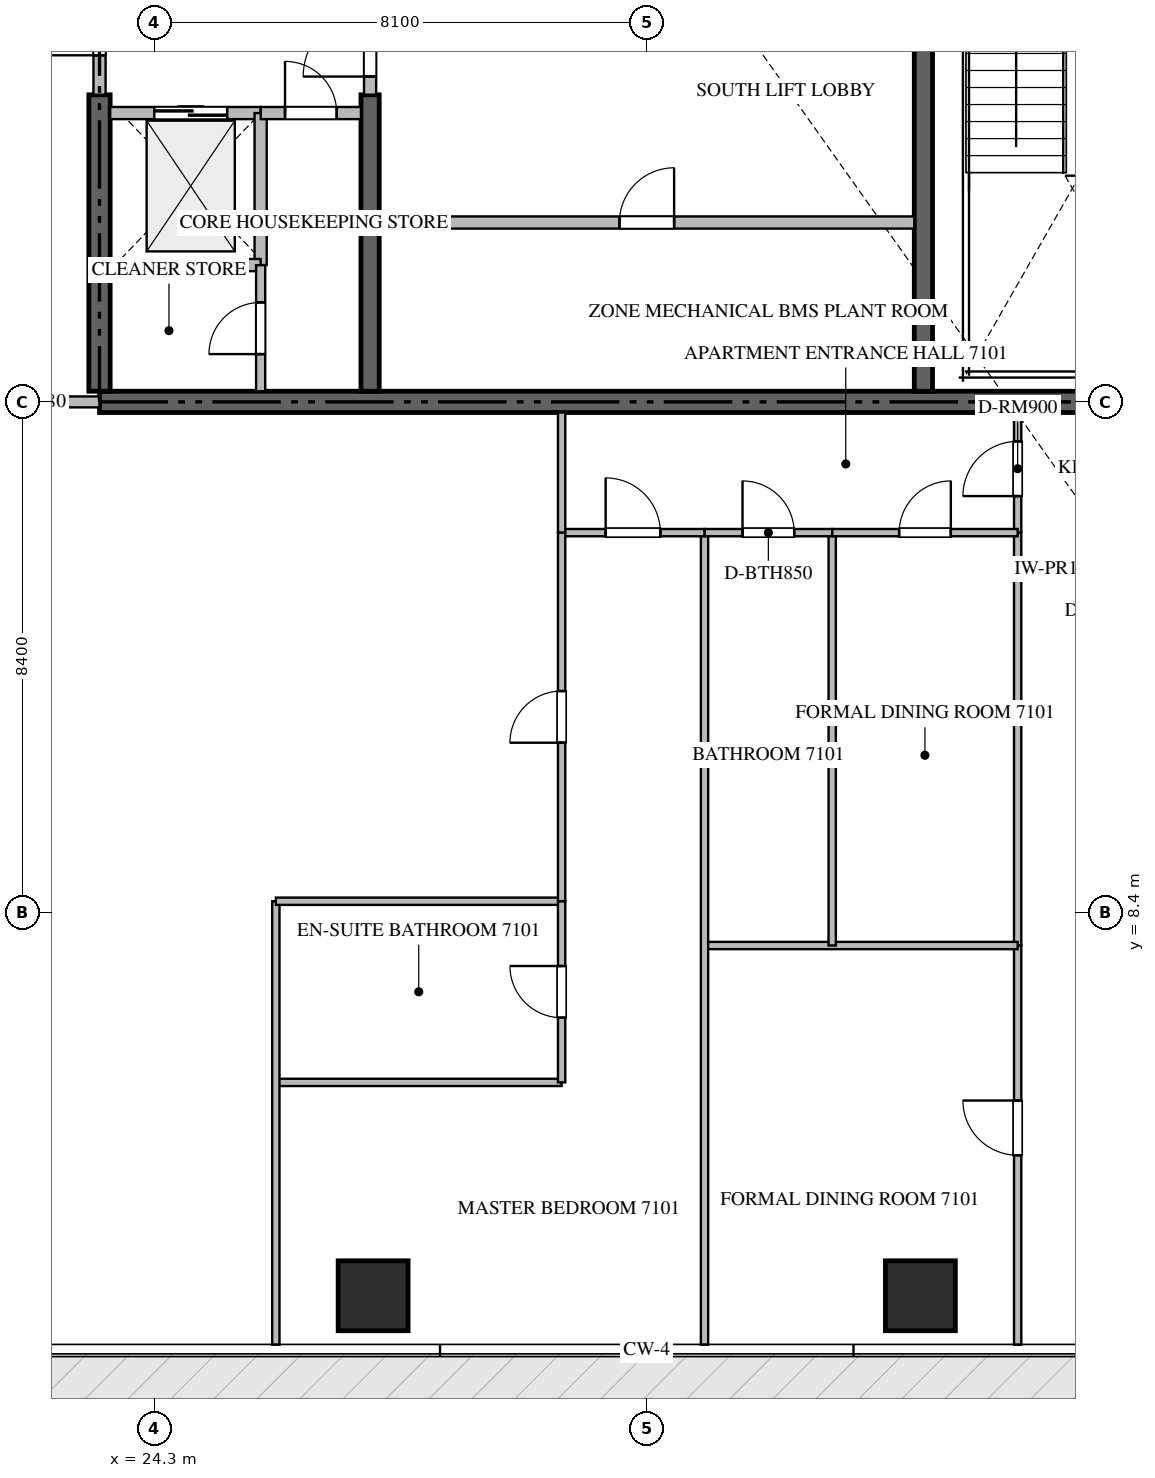
"""IFC4 building model, lengths in metres.
Left out: names, types, materials, properties, quantities, classifications, styles, units other than length and angle.
Written with IfcOpenShell. Run it as: python <this file> out.ifc"""

import sys

from ifc_helpers import new_model, si_unit, direction, frame, frame_2d, origin, origin_2d, place, context, subcontext, project, spatial, rectangle, extrude, source, transform, mapped, element, fill, save


model = new_model("IFC4")
c1 = context("Model", 3, precision=1e-05, world=origin(), true_north=direction((0.0, 1.0)))
c2 = subcontext(c1, "Body", "Model", "MODEL_VIEW")
j1 = project(units=[si_unit("LENGTHUNIT", "METRE"), si_unit("PLANEANGLEUNIT", "RADIAN")], contexts=[c1])
p1 = place(None, origin())
s1 = spatial("IfcSite", under=j1, at=p1, CompositionType="ELEMENT")
p2 = place(p1, origin())
s2 = spatial("IfcBuilding", under=s1, at=p2, CompositionType="ELEMENT")
p3 = place(p2, frame((0.0, 0.0, 283.6)))
s3 = spatial("IfcBuildingStorey", under=s2, at=p3, CompositionType="ELEMENT", Elevation=283.6)
p4 = place(p3, frame((23.4, 16.8, -0.26), z_axis=(0.0, 0.0, 1.0), x_axis=(1.0, 0.0, 0.0)))
e1 = element("IfcWall", 1, at=p4, inside=s3, PredefinedType="SHEAR", context=c2, shape_type="SweptSolid", body=[
    extrude(rectangle(XDim=18.0, YDim=0.35, at=frame_2d((9.0, 0.0))), origin(), (0.0, 0.0, 1.0), 3.668),
])
p5 = place(p3, frame((23.4, 16.975, -0.26), z_axis=(0.0, 0.0, 1.0), x_axis=(0.0, 1.0, 0.0)))
e2 = element("IfcWall", 2, at=p5, inside=s3, PredefinedType="SHEAR", context=c2, shape_type="SweptSolid", body=[
    extrude(rectangle(XDim=4.875, YDim=0.35, at=frame_2d((2.438, 0.0))), origin(), (0.0, 0.0, 1.0), 3.668),
])
p6 = place(p3, frame((27.85, 16.975, -0.26), z_axis=(0.0, 0.0, 1.0), x_axis=(0.0, 1.0, 0.0)))
e3 = element("IfcWall", 3, at=p6, inside=s3, PredefinedType="SHEAR", context=c2, shape_type="SweptSolid", body=[
    extrude(rectangle(XDim=4.875, YDim=0.3, at=frame_2d((2.438, 0.0))), origin(), (0.0, 0.0, 1.0), 3.668),
])
p7 = place(p3, frame((36.95, 16.975, -0.26), z_axis=(0.0, 0.0, 1.0), x_axis=(0.0, 1.0, 0.0)))
e4 = element("IfcWall", 4, at=p7, inside=s3, PredefinedType="SHEAR", context=c2, shape_type="SweptSolid", body=[
    extrude(rectangle(XDim=8.375, YDim=0.3, at=frame_2d((4.188, 0.0))), origin(), (0.0, 0.0, 1.0), 3.668),
])
m1 = source(origin(), c2, "Body", "SweptSolid", [
    extrude(rectangle(XDim=1.15, YDim=1.15, at=origin_2d()), origin(), (0.0, 0.0, 1.0), 3.67),
])
for number, where, z_axis, x_axis in (
    (5, (27.9, 2.1, -0.26), (0.0, 0.0, 1.0), (1.0, 0.0, 0.0)),
    (6, (36.9, 2.1, -0.26), (0.0, 0.0, 1.0), (1.0, 0.0, 0.0)),
):
    element("IfcColumn", number, at=place(p3, frame(where, z_axis=z_axis, x_axis=x_axis)), inside=s3, PredefinedType="COLUMN", context=c2, shape_type="MappedRepresentation", body=[
        mapped(m1, transform((0.0, 0.0, 0.0), scale=1.0)),
    ])
p8 = place(p3, frame((23.575, 21.55, 0.0), z_axis=(0.0, 0.0, 1.0), x_axis=(1.0, 0.0, 0.0)))
e7 = element("IfcWall", 7, at=p8, inside=s3, PredefinedType="STANDARD", context=c2, shape_type="SweptSolid", body=[
    extrude(rectangle(XDim=2.475, YDim=0.2, at=frame_2d((1.238, 0.0))), origin(), (0.0, 0.0, 1.0), 3.41),
])
p9 = place(p8, frame((0.725, 0.0, 0.0)))
e8 = element("IfcOpeningElement", 8, at=p9, cuts=e7, PredefinedType="OPENING", context=c2, shape_type="SweptSolid", body=[
    extrude(rectangle(XDim=1.2, YDim=2.2, at=frame_2d((0.6, 1.1))), frame((0.0, 0.11, 0.0), z_axis=(0.0, -1.0, 0.0), x_axis=(1.0, 0.0, 0.0)), (0.0, 0.0, 1.0), 0.22),
])
p10 = place(p3, frame((26.05, 19.05, 0.0), z_axis=(0.0, 0.0, 1.0), x_axis=(0.0, 1.0, 0.0)))
e9 = element("IfcWall", 9, at=p10, inside=s3, PredefinedType="STANDARD", context=c2, shape_type="SweptSolid", body=[
    extrude(rectangle(XDim=2.5, YDim=0.2, at=frame_2d((1.25, 0.0))), origin(), (0.0, 0.0, 1.0), 3.41),
])
p11 = place(p3, frame((23.575, 19.05, 0.0), z_axis=(0.0, 0.0, 1.0), x_axis=(1.0, 0.0, 0.0)))
e10 = element("IfcWall", 10, at=p11, inside=s3, PredefinedType="STANDARD", context=c2, shape_type="SweptSolid", body=[
    extrude(rectangle(XDim=2.475, YDim=0.2, at=frame_2d((1.238, 0.0))), origin(), (0.0, 0.0, 1.0), 3.41),
])
p12 = place(p3, frame((26.052, 21.55, 0.0), z_axis=(0.0, 0.0, 1.0), x_axis=(1.0, 0.0, 0.0)))
e11 = element("IfcWall", 11, at=p12, inside=s3, PredefinedType="STANDARD", context=c2, shape_type="SweptSolid", body=[
    extrude(rectangle(XDim=1.648, YDim=0.2, at=frame_2d((0.824, 0.0))), origin(), (0.0, 0.0, 1.0), 3.41),
])
p13 = place(p12, frame((0.399, 0.0, 0.0)))
e12 = element("IfcOpeningElement", 12, at=p13, cuts=e11, PredefinedType="OPENING", context=c2, shape_type="SweptSolid", body=[
    extrude(rectangle(XDim=0.85, YDim=2.1, at=frame_2d((0.425, 1.05))), frame((0.0, 0.11, 0.0), z_axis=(0.0, -1.0, 0.0), x_axis=(1.0, 0.0, 0.0)), (0.0, 0.0, 1.0), 0.22),
])
p14 = place(p3, frame((23.4, 21.852, 0.0), z_axis=(0.0, 0.0, 1.0), x_axis=(0.0, 1.0, 0.0)))
e13 = element("IfcWall", 13, at=p14, inside=s3, PredefinedType="STANDARD", context=c2, shape_type="SweptSolid", body=[
    extrude(rectangle(XDim=2.396, YDim=0.2, at=frame_2d((1.198, 0.0))), origin(), (0.0, 0.0, 1.0), 3.41),
])
p15 = place(p14, frame((0.648, 0.0, 0.0)))
e14 = element("IfcOpeningElement", 14, at=p15, cuts=e13, PredefinedType="OPENING", context=c2, shape_type="SweptSolid", body=[
    extrude(rectangle(XDim=1.1, YDim=2.15, at=frame_2d((0.55, 1.075))), frame((0.0, 0.11, 0.0), z_axis=(0.0, -1.0, 0.0), x_axis=(1.0, 0.0, 0.0)), (0.0, 0.0, 1.0), 0.22),
])
p16 = place(p3, frame((27.85, 21.852, 0.0), z_axis=(0.0, 0.0, 1.0), x_axis=(0.0, 1.0, 0.0)))
e15 = element("IfcWall", 15, at=p16, inside=s3, PredefinedType="STANDARD", context=c2, shape_type="SweptSolid", body=[
    extrude(rectangle(XDim=1.696, YDim=0.2, at=frame_2d((0.848, 0.0))), origin(), (0.0, 0.0, 1.0), 3.41),
])
p17 = place(p16, frame((0.298, 0.0, 0.0)))
e16 = element("IfcOpeningElement", 16, at=p17, cuts=e15, PredefinedType="OPENING", context=c2, shape_type="SweptSolid", body=[
    extrude(rectangle(XDim=1.1, YDim=2.15, at=frame_2d((0.55, 1.075))), frame((0.0, 0.11, 0.0), z_axis=(0.0, -1.0, 0.0), x_axis=(1.0, 0.0, 0.0)), (0.0, 0.0, 1.0), 0.22),
])
p18 = place(p3, frame((26.05, 16.975, 0.0), z_axis=(0.0, 0.0, 1.0), x_axis=(0.0, 1.0, 0.0)))
e17 = element("IfcWall", 17, at=p18, inside=s3, PredefinedType="PARTITIONING", context=c2, shape_type="SweptSolid", body=[
    extrude(rectangle(XDim=2.073, YDim=0.15, at=frame_2d((1.037, 0.0))), origin(), (0.0, 0.0, 1.0), 3.41),
])
p19 = place(p18, frame((0.611, 0.0, 0.0)))
e18 = element("IfcOpeningElement", 18, at=p19, cuts=e17, PredefinedType="OPENING", context=c2, shape_type="SweptSolid", body=[
    extrude(rectangle(XDim=0.85, YDim=2.1, at=frame_2d((0.425, 1.05))), frame((0.0, 0.085, 0.0), z_axis=(0.0, -1.0, 0.0), x_axis=(1.0, 0.0, 0.0)), (0.0, 0.0, 1.0), 0.17),
])
p20 = place(p3, frame((28.0, 19.75, 0.0), z_axis=(0.0, 0.0, 1.0), x_axis=(1.0, 0.0, 0.0)))
e19 = element("IfcWall", 19, at=p20, inside=s3, PredefinedType="STANDARD", context=c2, shape_type="SweptSolid", body=[
    extrude(rectangle(XDim=8.8, YDim=0.2, at=frame_2d((4.4, 0.0))), origin(), (0.0, 0.0, 1.0), 3.41),
])
p21 = place(p20, frame((3.95, 0.0, 0.0)))
e20 = element("IfcOpeningElement", 20, at=p21, cuts=e19, PredefinedType="OPENING", context=c2, shape_type="SweptSolid", body=[
    extrude(rectangle(XDim=0.9, YDim=2.1, at=frame_2d((0.45, 1.05))), frame((0.0, 0.11, 0.0), z_axis=(0.0, -1.0, 0.0), x_axis=(1.0, 0.0, 0.0)), (0.0, 0.0, 1.0), 0.22),
])
p22 = place(p3, frame((20.902, 16.8, 0.0), z_axis=(0.0, 0.0, 1.0), x_axis=(1.0, 0.0, 0.0)))
e21 = element("IfcWall", 21, at=p22, inside=s3, PredefinedType="PARTITIONING", context=c2, shape_type="SweptSolid", body=[
    extrude(rectangle(XDim=2.496, YDim=0.18, at=frame_2d((1.248, 0.0))), origin(), (0.0, 0.0, 1.0), 3.41),
])
p23 = place(p3, frame((38.5, 14.05, 0.0), z_axis=(0.0, 0.0, 1.0), x_axis=(1.0, 0.0, 0.0)))
e22 = element("IfcWall", 22, at=p23, inside=s3, PredefinedType="PARTITIONING", context=c2, shape_type="SweptSolid", body=[
    extrude(rectangle(XDim=2.85, YDim=0.12, at=frame_2d((1.425, 0.0))), origin(), (0.0, 0.0, 1.0), 3.41),
])
p24 = place(p23, frame((1.0, 0.0, 0.0)))
e23 = element("IfcOpeningElement", 23, at=p24, cuts=e22, PredefinedType="OPENING", context=c2, shape_type="SweptSolid", body=[
    extrude(rectangle(XDim=0.85, YDim=2.1, at=frame_2d((0.425, 1.05))), frame((0.0, 0.07, 0.0), z_axis=(0.0, -1.0, 0.0), x_axis=(1.0, 0.0, 0.0)), (0.0, 0.0, 1.0), 0.14),
])
p25 = place(p3, frame((38.5, 14.65, 0.0), z_axis=(0.0, 0.0, 1.0), x_axis=(0.0, 1.0, 0.0)))
e24 = element("IfcWall", 24, at=p25, inside=s3, PredefinedType="PARTITIONING", context=c2, shape_type="SweptSolid", body=[
    extrude(rectangle(XDim=1.975, YDim=0.12, at=frame_2d((0.988, 0.0))), origin(), (0.0, 0.0, 1.0), 3.41),
])
p26 = place(p25, frame((0.601, 0.0, 0.0)))
e25 = element("IfcOpeningElement", 25, at=p26, cuts=e24, PredefinedType="OPENING", context=c2, shape_type="SweptSolid", body=[
    extrude(rectangle(XDim=0.9, YDim=2.1, at=frame_2d((0.45, 1.05))), frame((0.0, 0.07, 0.0), z_axis=(0.0, -1.0, 0.0), x_axis=(1.0, 0.0, 0.0)), (0.0, 0.0, 1.0), 0.14),
])
p27 = place(p3, frame((38.5, 1.295, 0.0), z_axis=(0.0, 0.0, 1.0), x_axis=(0.0, 1.0, 0.0)))
e26 = element("IfcWall", 26, at=p27, inside=s3, PredefinedType="PARTITIONING", context=c2, shape_type="SweptSolid", body=[
    extrude(rectangle(XDim=6.565, YDim=0.12, at=frame_2d((3.283, 0.0))), origin(), (0.0, 0.0, 1.0), 3.41),
])
p28 = place(p27, frame((3.116, 0.0, 0.0)))
e27 = element("IfcOpeningElement", 27, at=p28, cuts=e26, PredefinedType="OPENING", context=c2, shape_type="SweptSolid", body=[
    extrude(rectangle(XDim=0.9, YDim=2.1, at=frame_2d((0.45, 1.05))), frame((0.0, 0.07, 0.0), z_axis=(0.0, -1.0, 0.0), x_axis=(1.0, 0.0, 0.0)), (0.0, 0.0, 1.0), 0.14),
])
p29 = place(p3, frame((38.5, 7.862, 0.0), z_axis=(0.0, 0.0, 1.0), x_axis=(0.0, 1.0, 0.0)))
e28 = element("IfcWall", 28, at=p29, inside=s3, PredefinedType="PARTITIONING", context=c2, shape_type="SweptSolid", body=[
    extrude(rectangle(XDim=6.786, YDim=0.12, at=frame_2d((3.393, 0.0))), origin(), (0.0, 0.0, 1.0), 3.41),
])
p30 = place(p3, frame((33.35, 7.86, 0.0), z_axis=(0.0, 0.0, 1.0), x_axis=(1.0, 0.0, 0.0)))
e29 = element("IfcWall", 29, at=p30, inside=s3, PredefinedType="PARTITIONING", context=c2, shape_type="SweptSolid", body=[
    extrude(rectangle(XDim=5.15, YDim=0.12, at=frame_2d((2.575, 0.0))), origin(), (0.0, 0.0, 1.0), 3.41),
])
p31 = place(p3, frame((33.35, 1.295, 0.0), z_axis=(0.0, 0.0, 1.0), x_axis=(0.0, 1.0, 0.0)))
e30 = element("IfcWall", 30, at=p31, inside=s3, PredefinedType="PARTITIONING", context=c2, shape_type="SweptSolid", body=[
    extrude(rectangle(XDim=13.355, YDim=0.12, at=frame_2d((6.677, 0.0))), origin(), (0.0, 0.0, 1.0), 3.41),
])
p32 = place(p3, frame((35.45, 7.86, 0.0), z_axis=(0.0, 0.0, 1.0), x_axis=(0.0, 1.0, 0.0)))
e31 = element("IfcWall", 31, at=p32, inside=s3, PredefinedType="PARTITIONING", context=c2, shape_type="SweptSolid", body=[
    extrude(rectangle(XDim=6.79, YDim=0.12, at=frame_2d((3.395, 0.0))), origin(), (0.0, 0.0, 1.0), 3.41),
])
p33 = place(p3, frame((33.35, 14.65, 0.0), z_axis=(0.0, 0.0, 1.0), x_axis=(1.0, 0.0, 0.0)))
e32 = element("IfcWall", 32, at=p33, inside=s3, PredefinedType="PARTITIONING", context=c2, shape_type="SweptSolid", body=[
    extrude(rectangle(XDim=2.1, YDim=0.12, at=frame_2d((1.05, 0.0))), origin(), (0.0, 0.0, 1.0), 3.41),
])
p34 = place(p33, frame((0.625, 0.0, 0.0)))
e33 = element("IfcOpeningElement", 33, at=p34, cuts=e32, PredefinedType="OPENING", context=c2, shape_type="SweptSolid", body=[
    extrude(rectangle(XDim=0.85, YDim=2.1, at=frame_2d((0.425, 1.05))), frame((0.0, 0.07, 0.0), z_axis=(0.0, -1.0, 0.0), x_axis=(1.0, 0.0, 0.0)), (0.0, 0.0, 1.0), 0.14),
])
p35 = place(p3, frame((35.452, 14.65, 0.0), z_axis=(0.0, 0.0, 1.0), x_axis=(1.0, 0.0, 0.0)))
e34 = element("IfcWall", 34, at=p35, inside=s3, PredefinedType="PARTITIONING", context=c2, shape_type="SweptSolid", body=[
    extrude(rectangle(XDim=3.048, YDim=0.12, at=frame_2d((1.524, 0.0))), origin(), (0.0, 0.0, 1.0), 3.41),
])
p36 = place(p35, frame((1.099, 0.0, 0.0)))
e35 = element("IfcOpeningElement", 35, at=p36, cuts=e34, PredefinedType="OPENING", context=c2, shape_type="SweptSolid", body=[
    extrude(rectangle(XDim=0.85, YDim=2.1, at=frame_2d((0.425, 1.05))), frame((0.0, 0.07, 0.0), z_axis=(0.0, -1.0, 0.0), x_axis=(1.0, 0.0, 0.0)), (0.0, 0.0, 1.0), 0.14),
])
p37 = place(p3, frame((31.0, 14.65, 0.0), z_axis=(0.0, 0.0, 1.0), x_axis=(1.0, 0.0, 0.0)))
e36 = element("IfcWall", 36, at=p37, inside=s3, PredefinedType="PARTITIONING", context=c2, shape_type="SweptSolid", body=[
    extrude(rectangle(XDim=2.348, YDim=0.12, at=frame_2d((1.174, 0.0))), origin(), (0.0, 0.0, 1.0), 3.41),
])
p38 = place(p37, frame((0.724, 0.0, 0.0)))
e37 = element("IfcOpeningElement", 37, at=p38, cuts=e36, PredefinedType="OPENING", context=c2, shape_type="SweptSolid", body=[
    extrude(rectangle(XDim=0.9, YDim=2.1, at=frame_2d((0.45, 1.05))), frame((0.0, 0.07, 0.0), z_axis=(0.0, -1.0, 0.0), x_axis=(1.0, 0.0, 0.0)), (0.0, 0.0, 1.0), 0.14),
])
p39 = place(p3, frame((26.3, 5.609, 0.0), z_axis=(0.0, 0.0, 1.0), x_axis=(1.0, 0.0, 0.0)))
e38 = element("IfcWall", 38, at=p39, inside=s3, PredefinedType="PARTITIONING", context=c2, shape_type="SweptSolid", body=[
    extrude(rectangle(XDim=4.7, YDim=0.12, at=frame_2d((2.35, 0.0))), origin(), (0.0, 0.0, 1.0), 3.41),
])
p40 = place(p3, frame((26.3, 1.295, 0.0), z_axis=(0.0, 0.0, 1.0), x_axis=(0.0, 1.0, 0.0)))
e39 = element("IfcWall", 39, at=p40, inside=s3, PredefinedType="PARTITIONING", context=c2, shape_type="SweptSolid", body=[
    extrude(rectangle(XDim=7.293, YDim=0.12, at=frame_2d((3.646, 0.0))), origin(), (0.0, 0.0, 1.0), 3.41),
])
p41 = place(p3, frame((26.3, 8.588, 0.0), z_axis=(0.0, 0.0, 1.0), x_axis=(1.0, 0.0, 0.0)))
e40 = element("IfcWall", 40, at=p41, inside=s3, PredefinedType="PARTITIONING", context=c2, shape_type="SweptSolid", body=[
    extrude(rectangle(XDim=4.7, YDim=0.12, at=frame_2d((2.35, 0.0))), origin(), (0.0, 0.0, 1.0), 3.41),
])
p42 = place(p3, frame((31.0, 5.609, 0.0), z_axis=(0.0, 0.0, 1.0), x_axis=(0.0, 1.0, 0.0)))
e41 = element("IfcWall", 41, at=p42, inside=s3, PredefinedType="PARTITIONING", context=c2, shape_type="SweptSolid", body=[
    extrude(rectangle(XDim=2.979, YDim=0.12, at=frame_2d((1.49, 0.0))), origin(), (0.0, 0.0, 1.0), 3.41),
])
p43 = place(p42, frame((1.064, 0.0, 0.0)))
e42 = element("IfcOpeningElement", 42, at=p43, cuts=e41, PredefinedType="OPENING", context=c2, shape_type="SweptSolid", body=[
    extrude(rectangle(XDim=0.85, YDim=2.1, at=frame_2d((0.425, 1.05))), frame((0.0, 0.07, 0.0), z_axis=(0.0, -1.0, 0.0), x_axis=(1.0, 0.0, 0.0)), (0.0, 0.0, 1.0), 0.14),
])
p44 = place(p3, frame((31.0, 8.59, 0.0), z_axis=(0.0, 0.0, 1.0), x_axis=(0.0, 1.0, 0.0)))
e43 = element("IfcWall", 43, at=p44, inside=s3, PredefinedType="PARTITIONING", context=c2, shape_type="SweptSolid", body=[
    extrude(rectangle(XDim=6.06, YDim=0.12, at=frame_2d((3.03, 0.0))), origin(), (0.0, 0.0, 1.0), 3.41),
])
p45 = place(p44, frame((2.605, 0.0, 0.0)))
e44 = element("IfcOpeningElement", 44, at=p45, cuts=e43, PredefinedType="OPENING", context=c2, shape_type="SweptSolid", body=[
    extrude(rectangle(XDim=0.85, YDim=2.1, at=frame_2d((0.425, 1.05))), frame((0.0, 0.07, 0.0), z_axis=(0.0, -1.0, 0.0), x_axis=(1.0, 0.0, 0.0)), (0.0, 0.0, 1.0), 0.14),
])
p46 = place(p3, frame((31.0, 14.652, 0.0), z_axis=(0.0, 0.0, 1.0), x_axis=(0.0, 1.0, 0.0)))
e45 = element("IfcWall", 45, at=p46, inside=s3, PredefinedType="PARTITIONING", context=c2, shape_type="SweptSolid", body=[
    extrude(rectangle(XDim=1.973, YDim=0.12, at=frame_2d((0.986, 0.0))), origin(), (0.0, 0.0, 1.0), 3.41),
])
m2 = source(origin(), c2, "Body", "SweptSolid", [
    extrude(rectangle(XDim=1.2, YDim=2.2, at=frame_2d((0.6, 1.1))), frame((0.0, 0.025, 0.0), z_axis=(0.0, -1.0, 0.0), x_axis=(1.0, 0.0, 0.0)), (0.0, 0.0, 1.0), 0.05),
])
p47 = place(p9, origin())
e46 = element("IfcDoor", 46, at=p47, inside=s3, OperationType="DOUBLE_DOOR_SLIDING", PredefinedType="DOOR", context=c2, shape_type="MappedRepresentation", body=[
    mapped(m2, transform((0.0, 0.0, 0.0), scale=1.0)),
])
fill(e8, e46)
m3 = source(origin(), c2, "Body", "SweptSolid", [
    extrude(rectangle(XDim=0.85, YDim=2.1, at=frame_2d((0.425, 1.05))), frame((0.0, 0.025, 0.0), z_axis=(0.0, -1.0, 0.0), x_axis=(1.0, 0.0, 0.0)), (0.0, 0.0, 1.0), 0.05),
])
p48 = place(p13, origin())
e47 = element("IfcDoor", 47, at=p48, inside=s3, OperationType="SINGLE_SWING_LEFT", PredefinedType="DOOR", context=c2, shape_type="MappedRepresentation", body=[
    mapped(m3, transform((0.0, 0.0, 0.0), scale=1.0)),
])
fill(e12, e47)
m4 = source(origin(), c2, "Body", "SweptSolid", [
    extrude(rectangle(XDim=1.1, YDim=2.15, at=frame_2d((0.55, 1.075))), frame((0.0, 0.025, 0.0), z_axis=(0.0, -1.0, 0.0), x_axis=(1.0, 0.0, 0.0)), (0.0, 0.0, 1.0), 0.05),
])
p49 = place(p15, origin())
e48 = element("IfcDoor", 48, at=p49, inside=s3, OperationType="SINGLE_SWING_LEFT", PredefinedType="DOOR", context=c2, shape_type="MappedRepresentation", body=[
    mapped(m4, transform((0.0, 0.0, 0.0), scale=1.0)),
])
fill(e14, e48)
p50 = place(p17, origin())
e49 = element("IfcDoor", 49, at=p50, inside=s3, OperationType="SINGLE_SWING_LEFT", PredefinedType="DOOR", context=c2, shape_type="MappedRepresentation", body=[
    mapped(m4, transform((0.0, 0.0, 0.0), scale=1.0)),
])
fill(e16, e49)
p51 = place(p19, origin())
e50 = element("IfcDoor", 50, at=p51, inside=s3, OperationType="SINGLE_SWING_LEFT", PredefinedType="DOOR", context=c2, shape_type="MappedRepresentation", body=[
    mapped(m3, transform((0.0, 0.0, 0.0), scale=1.0)),
])
fill(e18, e50)
m5 = source(origin(), c2, "Body", "SweptSolid", [
    extrude(rectangle(XDim=0.9, YDim=2.1, at=frame_2d((0.45, 1.05))), frame((0.0, 0.025, 0.0), z_axis=(0.0, -1.0, 0.0), x_axis=(1.0, 0.0, 0.0)), (0.0, 0.0, 1.0), 0.05),
])
p52 = place(p21, origin())
e51 = element("IfcDoor", 51, at=p52, inside=s3, OperationType="SINGLE_SWING_RIGHT", PredefinedType="DOOR", context=c2, shape_type="MappedRepresentation", body=[
    mapped(m5, transform((0.0, 0.0, 0.0), scale=1.0)),
])
fill(e20, e51)
p53 = place(p26, origin())
e52 = element("IfcDoor", 52, at=p53, inside=s3, OperationType="SINGLE_SWING_LEFT", PredefinedType="DOOR", context=c2, shape_type="MappedRepresentation", body=[
    mapped(m5, transform((0.0, 0.0, 0.0), scale=1.0)),
])
fill(e25, e52)
p54 = place(p28, origin())
e53 = element("IfcDoor", 53, at=p54, inside=s3, OperationType="SINGLE_SWING_RIGHT", PredefinedType="DOOR", context=c2, shape_type="MappedRepresentation", body=[
    mapped(m5, transform((0.0, 0.0, 0.0), scale=1.0)),
])
fill(e27, e53)
p55 = place(p34, origin())
e54 = element("IfcDoor", 54, at=p55, inside=s3, OperationType="SINGLE_SWING_LEFT", PredefinedType="DOOR", context=c2, shape_type="MappedRepresentation", body=[
    mapped(m3, transform((0.0, 0.0, 0.0), scale=1.0)),
])
fill(e33, e54)
p56 = place(p36, origin())
e55 = element("IfcDoor", 55, at=p56, inside=s3, OperationType="SINGLE_SWING_RIGHT", PredefinedType="DOOR", context=c2, shape_type="MappedRepresentation", body=[
    mapped(m3, transform((0.0, 0.0, 0.0), scale=1.0)),
])
fill(e35, e55)
p57 = place(p38, origin())
e56 = element("IfcDoor", 56, at=p57, inside=s3, OperationType="SINGLE_SWING_LEFT", PredefinedType="DOOR", context=c2, shape_type="MappedRepresentation", body=[
    mapped(m5, transform((0.0, 0.0, 0.0), scale=1.0)),
])
fill(e37, e56)
p58 = place(p43, origin())
e57 = element("IfcDoor", 57, at=p58, inside=s3, OperationType="SINGLE_SWING_RIGHT", PredefinedType="DOOR", context=c2, shape_type="MappedRepresentation", body=[
    mapped(m3, transform((0.0, 0.0, 0.0), scale=1.0)),
])
fill(e42, e57)
p59 = place(p45, origin())
e58 = element("IfcDoor", 58, at=p59, inside=s3, OperationType="SINGLE_SWING_LEFT", PredefinedType="DOOR", context=c2, shape_type="MappedRepresentation", body=[
    mapped(m3, transform((0.0, 0.0, 0.0), scale=1.0)),
])
fill(e44, e58)
save(model, sys.argv[1])
